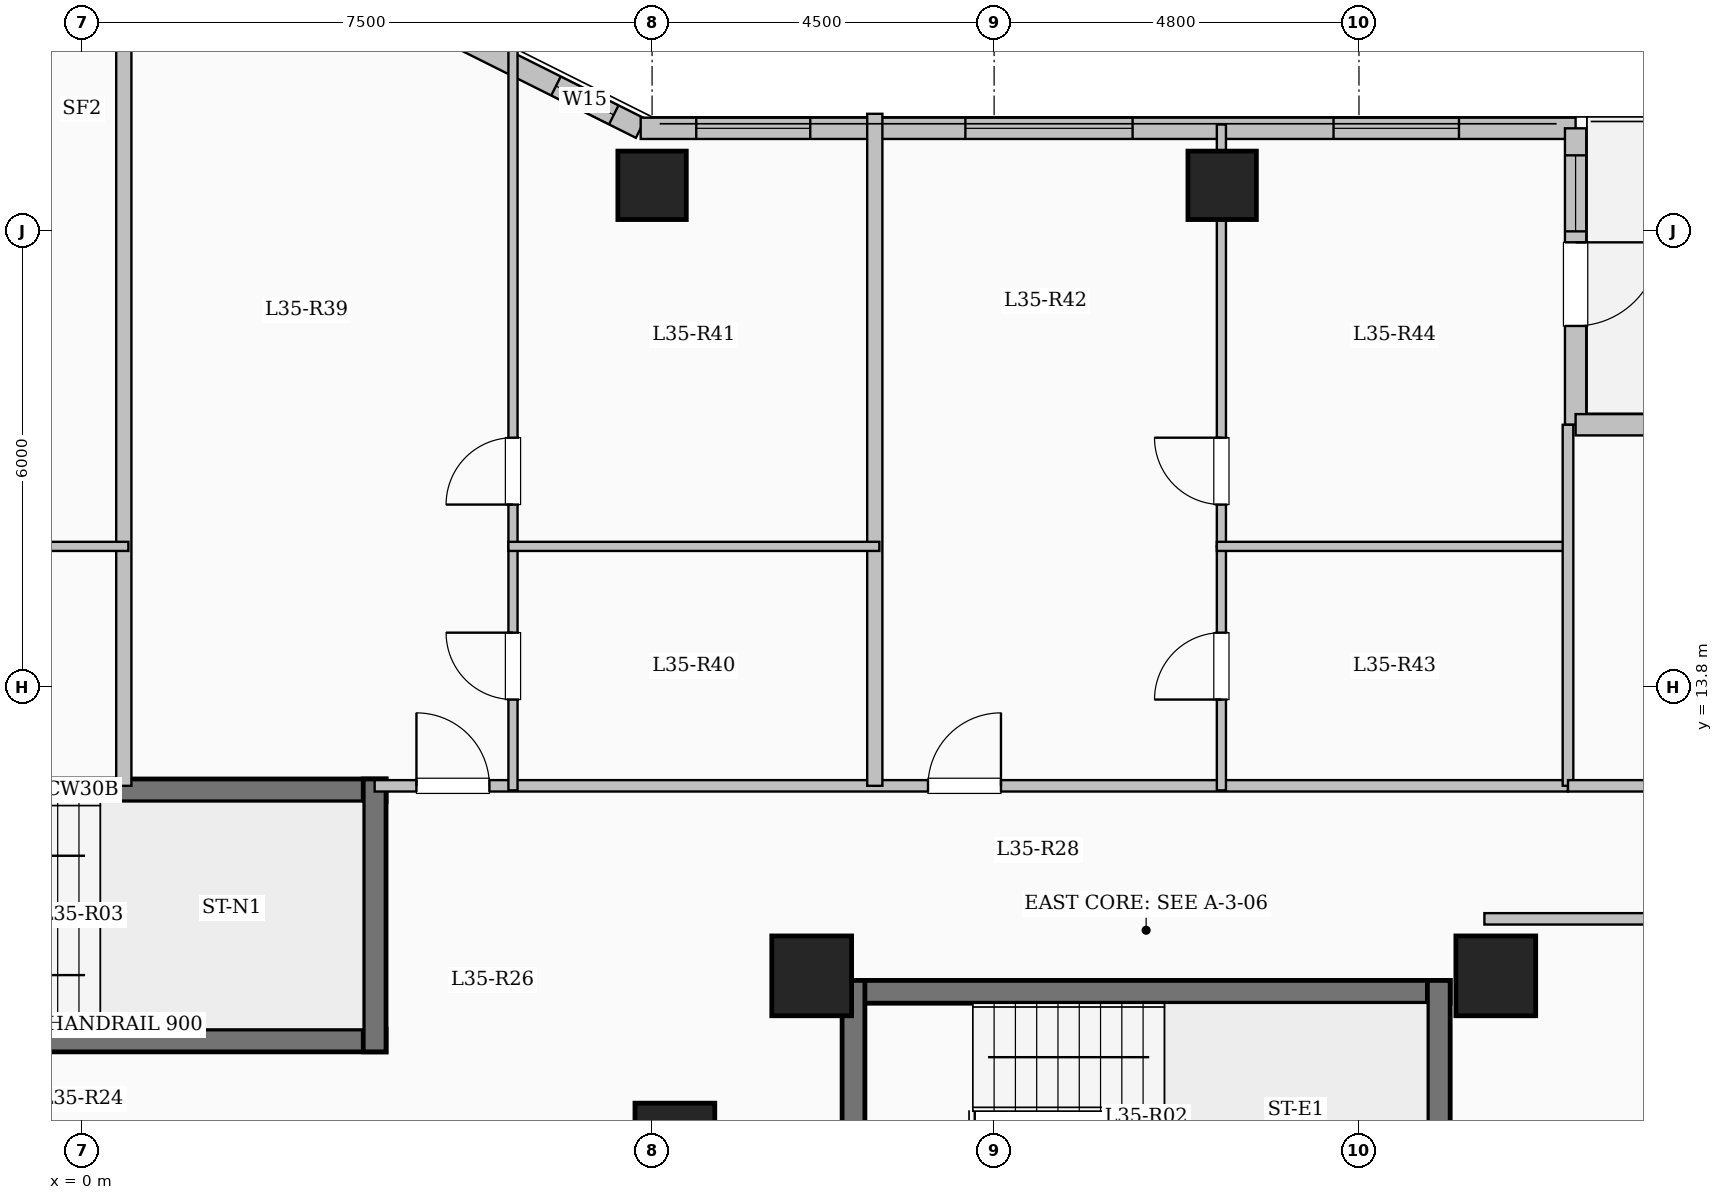
"""IFC4 building model, lengths in metres.
Left out: names, types, materials, properties, quantities, classifications, styles, units other than length and angle.
Written with IfcOpenShell. Run it as: python <this file> out.ifc"""

import sys

from ifc_helpers import new_model, si_unit, direction, frame, frame_2d, origin, origin_2d, place, context, subcontext, project, spatial, rectangle, extrude, element, fill, save


model = new_model("IFC4")
c1 = context("Model", 3, precision=1e-05, world=origin(), true_north=direction((0.0, 1.0)))
c2 = subcontext(c1, "Body", "Model", "MODEL_VIEW")
j1 = project(units=[si_unit("LENGTHUNIT", "METRE"), si_unit("PLANEANGLEUNIT", "RADIAN")], contexts=[c1])
p1 = place(None, origin())
s1 = spatial("IfcSite", under=j1, at=p1, CompositionType="ELEMENT")
p2 = place(p1, origin())
s2 = spatial("IfcBuilding", under=s1, at=p2, CompositionType="ELEMENT")
p3 = place(p2, frame((0.0, 0.0, 132.6)))
s3 = spatial("IfcBuildingStorey", under=s2, at=p3, CompositionType="ELEMENT", Elevation=132.6)
for number, where, z_axis, x_axis in (
    (1, (7.8, 7.8, 0.0), (0.0, 0.0, 1.0), (1.0, 0.0, 0.0)),
    (2, (9.6, 10.0, 0.0), (0.0, 0.0, 1.0), (1.0, 0.0, 0.0)),
    (3, (18.6, 10.0, 0.0), (0.0, 0.0, 1.0), (1.0, 0.0, 0.0)),
):
    element("IfcColumn", number, at=place(p3, frame(where, z_axis=z_axis, x_axis=x_axis)), inside=s3, PredefinedType="COLUMN", context=c2, shape_type="SweptSolid", body=[
        extrude(rectangle(XDim=1.05, YDim=1.05, at=origin_2d()), origin(), (0.0, 0.0, 1.0), 3.35),
    ])
for number, where, z_axis, x_axis in (
    (4, (7.5, 20.4, 0.0), (0.0, 0.0, 1.0), (1.0, 0.0, 0.0)),
    (5, (15.0, 20.4, 0.0), (0.0, 0.0, 1.0), (1.0, 0.0, 0.0)),
):
    element("IfcColumn", number, at=place(p3, frame(where, z_axis=z_axis, x_axis=x_axis)), inside=s3, PredefinedType="COLUMN", context=c2, shape_type="SweptSolid", body=[
        extrude(rectangle(XDim=0.9, YDim=0.9, at=origin_2d()), origin(), (0.0, 0.0, 1.0), 3.35),
    ])
p4 = place(p3, frame((4.35, 22.65, 0.0), z_axis=(0.0, 0.0, 1.0), x_axis=(0.894427191, -0.4472135955, 0.0)))
e6 = element("IfcWall", 6, at=p4, inside=s3, PredefinedType="SOLIDWALL", context=c2, shape_type="SweptSolid", body=[
    extrude(rectangle(XDim=3.354, YDim=0.28, at=frame_2d((1.677, 0.0))), origin(), (0.0, 0.0, 1.0), 3.1),
])
p5 = place(p4, frame((2.108, 0.0, 0.95)))
e7 = element("IfcOpeningElement", 7, at=p5, cuts=e6, PredefinedType="OPENING", context=c2, shape_type="SweptSolid", body=[
    extrude(rectangle(XDim=0.85, YDim=1.5, at=frame_2d((0.425, 0.75))), frame((0.0, 0.15, 0.0), z_axis=(0.0, -1.0, 0.0), x_axis=(1.0, 0.0, 0.0)), (0.0, 0.0, 1.0), 0.3),
])
p6 = place(p3, frame((7.35, 21.15, 0.0), z_axis=(0.0, 0.0, 1.0), x_axis=(1.0, 0.0, 0.0)))
e8 = element("IfcWall", 8, at=p6, inside=s3, PredefinedType="SOLIDWALL", context=c2, shape_type="SweptSolid", body=[
    extrude(rectangle(XDim=12.3, YDim=0.28, at=frame_2d((6.15, 0.0))), origin(), (0.0, 0.0, 1.0), 3.1),
])
p7 = place(p6, frame((0.731, 0.0, 0.9)))
e9 = element("IfcOpeningElement", 9, at=p7, cuts=e8, PredefinedType="OPENING", context=c2, shape_type="SweptSolid", body=[
    extrude(rectangle(XDim=1.5, YDim=1.65, at=frame_2d((0.75, 0.825))), frame((0.0, 0.15, 0.0), z_axis=(0.0, -1.0, 0.0), x_axis=(1.0, 0.0, 0.0)), (0.0, 0.0, 1.0), 0.3),
])
p8 = place(p6, frame((4.272, 0.0, 0.9)))
e10 = element("IfcOpeningElement", 10, at=p8, cuts=e8, PredefinedType="OPENING", context=c2, shape_type="SweptSolid", body=[
    extrude(rectangle(XDim=2.2, YDim=1.75, at=frame_2d((1.1, 0.875))), frame((0.0, 0.15, 0.0), z_axis=(0.0, -1.0, 0.0), x_axis=(1.0, 0.0, 0.0)), (0.0, 0.0, 1.0), 0.3),
])
p9 = place(p6, frame((9.115, 0.0, 0.9)))
e11 = element("IfcOpeningElement", 11, at=p9, cuts=e8, PredefinedType="OPENING", context=c2, shape_type="SweptSolid", body=[
    extrude(rectangle(XDim=1.65, YDim=1.6, at=frame_2d((0.825, 0.8))), frame((0.0, 0.15, 0.0), z_axis=(0.0, -1.0, 0.0), x_axis=(1.0, 0.0, 0.0)), (0.0, 0.0, 1.0), 0.3),
])
p10 = place(p3, frame((19.65, 21.15, 0.0), z_axis=(0.0, 0.0, 1.0), x_axis=(0.0, -1.0, 0.0)))
e12 = element("IfcWall", 12, at=p10, inside=s3, PredefinedType="SOLIDWALL", context=c2, shape_type="SweptSolid", body=[
    extrude(rectangle(XDim=3.9, YDim=0.28, at=frame_2d((1.95, 0.0))), origin(), (0.0, 0.0, 1.0), 3.1),
])
p11 = place(p10, frame((1.5, 0.0, 0.0)))
e13 = element("IfcOpeningElement", 13, at=p11, cuts=e12, PredefinedType="OPENING", context=c2, shape_type="SweptSolid", body=[
    extrude(rectangle(XDim=1.1, YDim=2.2, at=frame_2d((0.55, 1.1))), frame((0.0, 0.15, 0.0), z_axis=(0.0, -1.0, 0.0), x_axis=(1.0, 0.0, 0.0)), (0.0, 0.0, 1.0), 0.3),
])
p12 = place(p10, frame((0.355, 0.0, 0.95)))
e14 = element("IfcOpeningElement", 14, at=p12, cuts=e12, PredefinedType="OPENING", context=c2, shape_type="SweptSolid", body=[
    extrude(rectangle(XDim=1.0, YDim=1.5, at=frame_2d((0.5, 0.75))), frame((0.0, 0.15, 0.0), z_axis=(0.0, -1.0, 0.0), x_axis=(1.0, 0.0, 0.0)), (0.0, 0.0, 1.0), 0.3),
])
p13 = place(p3, frame((19.65, 17.25, 0.0), z_axis=(0.0, 0.0, 1.0), x_axis=(1.0, 0.0, 0.0)))
e15 = element("IfcWall", 15, at=p13, inside=s3, PredefinedType="SOLIDWALL", context=c2, shape_type="SweptSolid", body=[
    extrude(rectangle(XDim=5.4, YDim=0.28, at=frame_2d((2.7, 0.0))), origin(), (0.0, 0.0, 1.0), 3.1),
])
p14 = place(p13, frame((1.675, 0.0, 0.9)))
e16 = element("IfcOpeningElement", 16, at=p14, cuts=e15, PredefinedType="OPENING", context=c2, shape_type="SweptSolid", body=[
    extrude(rectangle(XDim=2.0, YDim=1.7, at=frame_2d((1.0, 0.85))), frame((0.0, 0.15, 0.0), z_axis=(0.0, -1.0, 0.0), x_axis=(1.0, 0.0, 0.0)), (0.0, 0.0, 1.0), 0.3),
])
p15 = place(p3, frame((10.0, 9.79, 0.0), z_axis=(0.0, 0.0, 1.0), x_axis=(1.0, 0.0, 0.0)))
e17 = element("IfcWall", 17, at=p15, inside=s3, PredefinedType="SHEAR", context=c2, shape_type="SweptSolid", body=[
    extrude(rectangle(XDim=8.0, YDim=0.3, at=frame_2d((4.0, 0.0))), origin(), (0.0, 0.0, 1.0), 3.35),
])
for number, where, z_axis, x_axis in (
    (18, (10.15, 6.35, 0.0), (0.0, 0.0, 1.0), (0.0, 1.0, 0.0)),
    (19, (17.85, 6.35, 0.0), (0.0, 0.0, 1.0), (0.0, 1.0, 0.0)),
):
    element("IfcWall", number, at=place(p3, frame(where, z_axis=z_axis, x_axis=x_axis)), inside=s3, PredefinedType="SHEAR", context=c2, shape_type="SweptSolid", body=[
        extrude(rectangle(XDim=3.59, YDim=0.3, at=frame_2d((1.795, 0.0))), origin(), (0.0, 0.0, 1.0), 3.35),
    ])
p16 = place(p3, frame((-4.0, 12.44, 0.0), z_axis=(0.0, 0.0, 1.0), x_axis=(1.0, 0.0, 0.0)))
e20 = element("IfcWall", 20, at=p16, inside=s3, PredefinedType="SHEAR", context=c2, shape_type="SweptSolid", body=[
    extrude(rectangle(XDim=8.0, YDim=0.3, at=frame_2d((4.0, 0.0))), origin(), (0.0, 0.0, 1.0), 3.35),
])
p17 = place(p3, frame((-4.0, 9.15, 0.0), z_axis=(0.0, 0.0, 1.0), x_axis=(1.0, 0.0, 0.0)))
e21 = element("IfcWall", 21, at=p17, inside=s3, PredefinedType="SHEAR", context=c2, shape_type="SweptSolid", body=[
    extrude(rectangle(XDim=8.0, YDim=0.3, at=frame_2d((4.0, 0.0))), origin(), (0.0, 0.0, 1.0), 3.35),
])
p18 = place(p17, frame((0.55, 0.0, 0.0)))
e22 = element("IfcOpeningElement", 22, at=p18, cuts=e21, PredefinedType="OPENING", context=c2, shape_type="SweptSolid", body=[
    extrude(rectangle(XDim=1.0, YDim=2.15, at=frame_2d((0.5, 1.075))), frame((0.0, 0.16, 0.0), z_axis=(0.0, -1.0, 0.0), x_axis=(1.0, 0.0, 0.0)), (0.0, 0.0, 1.0), 0.32),
])
p19 = place(p3, frame((3.85, 9.0, 0.0), z_axis=(0.0, 0.0, 1.0), x_axis=(0.0, 1.0, 0.0)))
e23 = element("IfcWall", 23, at=p19, inside=s3, PredefinedType="SHEAR", context=c2, shape_type="SweptSolid", body=[
    extrude(rectangle(XDim=3.59, YDim=0.3, at=frame_2d((1.795, 0.0))), origin(), (0.0, 0.0, 1.0), 3.35),
])
p20 = place(p3, frame((3.85, 12.5, 0.0), z_axis=(0.0, 0.0, 1.0), x_axis=(1.0, 0.0, 0.0)))
e24 = element("IfcWall", 24, at=p20, inside=s3, PredefinedType="PARTITIONING", context=c2, shape_type="SweptSolid", body=[
    extrude(rectangle(XDim=15.7, YDim=0.15, at=frame_2d((7.85, 0.0))), origin(), (0.0, 0.0, 1.0), 3.1),
])
p21 = place(p20, frame((0.55, 0.0, 0.0)))
e25 = element("IfcOpeningElement", 25, at=p21, cuts=e24, PredefinedType="OPENING", context=c2, shape_type="SweptSolid", body=[
    extrude(rectangle(XDim=0.96, YDim=2.15, at=frame_2d((0.48, 1.075))), frame((0.0, 0.085, 0.0), z_axis=(0.0, -1.0, 0.0), x_axis=(1.0, 0.0, 0.0)), (0.0, 0.0, 1.0), 0.17),
])
p22 = place(p20, frame((7.28, 0.0, 0.0)))
e26 = element("IfcOpeningElement", 26, at=p22, cuts=e24, PredefinedType="OPENING", context=c2, shape_type="SweptSolid", body=[
    extrude(rectangle(XDim=0.96, YDim=2.15, at=frame_2d((0.48, 1.075))), frame((0.0, 0.085, 0.0), z_axis=(0.0, -1.0, 0.0), x_axis=(1.0, 0.0, 0.0)), (0.0, 0.0, 1.0), 0.17),
])
p23 = place(p3, frame((0.55, 12.5, 0.0), z_axis=(0.0, 0.0, 1.0), x_axis=(0.0, 1.0, 0.0)))
e27 = element("IfcWall", 27, at=p23, inside=s3, PredefinedType="SOLIDWALL", context=c2, shape_type="SweptSolid", body=[
    extrude(rectangle(XDim=10.18, YDim=0.2, at=frame_2d((5.09, 0.0))), origin(), (0.0, 0.0, 1.0), 3.1),
])
p24 = place(p3, frame((-4.27, 15.65, 0.0), z_axis=(0.0, 0.0, 1.0), x_axis=(1.0, 0.0, 0.0)))
e28 = element("IfcWall", 28, at=p24, inside=s3, PredefinedType="PARTITIONING", context=c2, shape_type="SweptSolid", body=[
    extrude(rectangle(XDim=4.88, YDim=0.12, at=frame_2d((2.44, 0.0))), origin(), (0.0, 0.0, 1.0), 2.685),
])
p25 = place(p3, frame((10.43, 12.5, 0.0), z_axis=(0.0, 0.0, 1.0), x_axis=(0.0, 1.0, 0.0)))
e29 = element("IfcWall", 29, at=p25, inside=s3, PredefinedType="SOLIDWALL", context=c2, shape_type="SweptSolid", body=[
    extrude(rectangle(XDim=8.841, YDim=0.2, at=frame_2d((4.42, 0.0))), origin(), (0.0, 0.0, 1.0), 3.1),
])
p26 = place(p3, frame((5.67, 12.44, 0.0), z_axis=(0.0, 0.0, 1.0), x_axis=(0.0, 1.0, 0.0)))
e30 = element("IfcWall", 30, at=p26, inside=s3, PredefinedType="PARTITIONING", context=c2, shape_type="SweptSolid", body=[
    extrude(rectangle(XDim=3.21, YDim=0.12, at=frame_2d((1.605, 0.0))), origin(), (0.0, 0.0, 1.0), 3.1),
])
p27 = place(p26, frame((1.195, 0.0, 0.0)))
e31 = element("IfcOpeningElement", 31, at=p27, cuts=e30, PredefinedType="OPENING", context=c2, shape_type="SweptSolid", body=[
    extrude(rectangle(XDim=0.88, YDim=2.1, at=frame_2d((0.44, 1.05))), frame((0.0, 0.07, 0.0), z_axis=(0.0, -1.0, 0.0), x_axis=(1.0, 0.0, 0.0)), (0.0, 0.0, 1.0), 0.14),
])
p28 = place(p3, frame((5.67, 15.65, 0.0), z_axis=(0.0, 0.0, 1.0), x_axis=(0.0, 1.0, 0.0)))
e32 = element("IfcWall", 32, at=p28, inside=s3, PredefinedType="PARTITIONING", context=c2, shape_type="SweptSolid", body=[
    extrude(rectangle(XDim=6.865, YDim=0.12, at=frame_2d((3.433, 0.0))), origin(), (0.0, 0.0, 1.0), 3.1),
])
p29 = place(p28, frame((0.55, 0.0, 0.0)))
e33 = element("IfcOpeningElement", 33, at=p29, cuts=e32, PredefinedType="OPENING", context=c2, shape_type="SweptSolid", body=[
    extrude(rectangle(XDim=0.88, YDim=2.1, at=frame_2d((0.44, 1.05))), frame((0.0, 0.07, 0.0), z_axis=(0.0, -1.0, 0.0), x_axis=(1.0, 0.0, 0.0)), (0.0, 0.0, 1.0), 0.14),
])
p30 = place(p3, frame((5.61, 15.65, 0.0), z_axis=(0.0, 0.0, 1.0), x_axis=(1.0, 0.0, 0.0)))
e34 = element("IfcWall", 34, at=p30, inside=s3, PredefinedType="PARTITIONING", context=c2, shape_type="SweptSolid", body=[
    extrude(rectangle(XDim=4.88, YDim=0.12, at=frame_2d((2.44, 0.0))), origin(), (0.0, 0.0, 1.0), 2.685),
])
p31 = place(p3, frame((14.99, 12.44, 0.0), z_axis=(0.0, 0.0, 1.0), x_axis=(0.0, 1.0, 0.0)))
e35 = element("IfcWall", 35, at=p31, inside=s3, PredefinedType="PARTITIONING", context=c2, shape_type="SweptSolid", body=[
    extrude(rectangle(XDim=3.21, YDim=0.12, at=frame_2d((1.605, 0.0))), origin(), (0.0, 0.0, 1.0), 2.585),
])
p32 = place(p31, frame((1.195, 0.0, 0.0)))
e36 = element("IfcOpeningElement", 36, at=p32, cuts=e35, PredefinedType="OPENING", context=c2, shape_type="SweptSolid", body=[
    extrude(rectangle(XDim=0.88, YDim=2.1, at=frame_2d((0.44, 1.05))), frame((0.0, 0.07, 0.0), z_axis=(0.0, -1.0, 0.0), x_axis=(1.0, 0.0, 0.0)), (0.0, 0.0, 1.0), 0.14),
])
p33 = place(p3, frame((14.99, 15.65, 0.0), z_axis=(0.0, 0.0, 1.0), x_axis=(0.0, 1.0, 0.0)))
e37 = element("IfcWall", 37, at=p33, inside=s3, PredefinedType="PARTITIONING", context=c2, shape_type="SweptSolid", body=[
    extrude(rectangle(XDim=5.55, YDim=0.12, at=frame_2d((2.775, 0.0))), origin(), (0.0, 0.0, 1.0), 2.585),
])
p34 = place(p33, frame((0.55, 0.0, 0.0)))
e38 = element("IfcOpeningElement", 38, at=p34, cuts=e37, PredefinedType="OPENING", context=c2, shape_type="SweptSolid", body=[
    extrude(rectangle(XDim=0.88, YDim=2.1, at=frame_2d((0.44, 1.05))), frame((0.0, 0.07, 0.0), z_axis=(0.0, -1.0, 0.0), x_axis=(1.0, 0.0, 0.0)), (0.0, 0.0, 1.0), 0.14),
])
p35 = place(p3, frame((14.93, 15.65, 0.0), z_axis=(0.0, 0.0, 1.0), x_axis=(1.0, 0.0, 0.0)))
e39 = element("IfcWall", 39, at=p35, inside=s3, PredefinedType="PARTITIONING", context=c2, shape_type="SweptSolid", body=[
    extrude(rectangle(XDim=4.68, YDim=0.12, at=frame_2d((2.34, 0.0))), origin(), (0.0, 0.0, 1.0), 3.1),
])
p36 = place(p3, frame((18.45, 10.75, 0.0), z_axis=(0.0, 0.0, 1.0), x_axis=(1.0, 0.0, 0.0)))
e40 = element("IfcWall", 40, at=p36, inside=s3, PredefinedType="PARTITIONING", context=c2, shape_type="SweptSolid", body=[
    extrude(rectangle(XDim=6.63, YDim=0.15, at=frame_2d((3.315, 0.0))), origin(), (0.0, 0.0, 1.0), 3.1),
])
p37 = place(p3, frame((19.55, 12.5, 0.0), z_axis=(0.0, 0.0, 1.0), x_axis=(0.0, 1.0, 0.0)))
e41 = element("IfcWall", 41, at=p37, inside=s3, PredefinedType="PARTITIONING", context=c2, shape_type="SweptSolid", body=[
    extrude(rectangle(XDim=4.75, YDim=0.14, at=frame_2d((2.375, 0.0))), origin(), (0.0, 0.0, 1.0), 3.1),
])
p38 = place(p3, frame((19.55, 12.5, 0.0), z_axis=(0.0, 0.0, 1.0), x_axis=(1.0, 0.0, 0.0)))
e42 = element("IfcWall", 42, at=p38, inside=s3, PredefinedType="PARTITIONING", context=c2, shape_type="SweptSolid", body=[
    extrude(rectangle(XDim=5.53, YDim=0.15, at=frame_2d((2.765, 0.0))), origin(), (0.0, 0.0, 1.0), 3.1),
])
p39 = place(p38, frame((2.29, 0.0, 0.0)))
e43 = element("IfcOpeningElement", 43, at=p39, cuts=e42, PredefinedType="OPENING", context=c2, shape_type="SweptSolid", body=[
    extrude(rectangle(XDim=0.95, YDim=2.15, at=frame_2d((0.475, 1.075))), frame((0.0, 0.085, 0.0), z_axis=(0.0, -1.0, 0.0), x_axis=(1.0, 0.0, 0.0)), (0.0, 0.0, 1.0), 0.17),
])
p40 = place(p5, origin())
e44 = element("IfcWindow", 44, at=p40, inside=s3, PartitioningType="SINGLE_PANEL", PredefinedType="WINDOW", context=c2, shape_type="SweptSolid", body=[
    extrude(rectangle(XDim=0.85, YDim=1.5, at=frame_2d((0.425, 0.75))), frame((0.0, 0.03, 0.0), z_axis=(0.0, -1.0, 0.0), x_axis=(1.0, 0.0, 0.0)), (0.0, 0.0, 1.0), 0.06),
])
fill(e7, e44)
p41 = place(p7, origin())
e45 = element("IfcWindow", 45, at=p41, inside=s3, PartitioningType="SINGLE_PANEL", PredefinedType="WINDOW", context=c2, shape_type="SweptSolid", body=[
    extrude(rectangle(XDim=1.5, YDim=1.65, at=frame_2d((0.75, 0.825))), frame((0.0, 0.03, 0.0), z_axis=(0.0, -1.0, 0.0), x_axis=(1.0, 0.0, 0.0)), (0.0, 0.0, 1.0), 0.06),
])
fill(e9, e45)
p42 = place(p8, origin())
e46 = element("IfcWindow", 46, at=p42, inside=s3, PartitioningType="SINGLE_PANEL", PredefinedType="WINDOW", context=c2, shape_type="SweptSolid", body=[
    extrude(rectangle(XDim=2.2, YDim=1.75, at=frame_2d((1.1, 0.875))), frame((0.0, 0.03, 0.0), z_axis=(0.0, -1.0, 0.0), x_axis=(1.0, 0.0, 0.0)), (0.0, 0.0, 1.0), 0.06),
])
fill(e10, e46)
p43 = place(p9, origin())
e47 = element("IfcWindow", 47, at=p43, inside=s3, PartitioningType="SINGLE_PANEL", PredefinedType="WINDOW", context=c2, shape_type="SweptSolid", body=[
    extrude(rectangle(XDim=1.65, YDim=1.6, at=frame_2d((0.825, 0.8))), frame((0.0, 0.03, 0.0), z_axis=(0.0, -1.0, 0.0), x_axis=(1.0, 0.0, 0.0)), (0.0, 0.0, 1.0), 0.06),
])
fill(e11, e47)
p44 = place(p11, origin())
e48 = element("IfcDoor", 48, at=p44, inside=s3, OperationType="SINGLE_SWING_LEFT", PredefinedType="DOOR", context=c2, shape_type="SweptSolid", body=[
    extrude(rectangle(XDim=1.1, YDim=2.2, at=frame_2d((0.55, 1.1))), frame((0.0, 0.025, 0.0), z_axis=(0.0, -1.0, 0.0), x_axis=(1.0, 0.0, 0.0)), (0.0, 0.0, 1.0), 0.05),
])
fill(e13, e48)
p45 = place(p12, origin())
e49 = element("IfcWindow", 49, at=p45, inside=s3, PartitioningType="SINGLE_PANEL", PredefinedType="WINDOW", context=c2, shape_type="SweptSolid", body=[
    extrude(rectangle(XDim=1.0, YDim=1.5, at=frame_2d((0.5, 0.75))), frame((0.0, 0.03, 0.0), z_axis=(0.0, -1.0, 0.0), x_axis=(1.0, 0.0, 0.0)), (0.0, 0.0, 1.0), 0.06),
])
fill(e14, e49)
p46 = place(p21, origin())
e50 = element("IfcDoor", 50, at=p46, inside=s3, OperationType="SINGLE_SWING_LEFT", PredefinedType="DOOR", context=c2, shape_type="SweptSolid", body=[
    extrude(rectangle(XDim=0.96, YDim=2.15, at=frame_2d((0.48, 1.075))), frame((0.0, 0.025, 0.0), z_axis=(0.0, -1.0, 0.0), x_axis=(1.0, 0.0, 0.0)), (0.0, 0.0, 1.0), 0.05),
])
fill(e25, e50)
p47 = place(p27, origin())
e51 = element("IfcDoor", 51, at=p47, inside=s3, OperationType="SINGLE_SWING_RIGHT", PredefinedType="DOOR", context=c2, shape_type="SweptSolid", body=[
    extrude(rectangle(XDim=0.88, YDim=2.1, at=frame_2d((0.44, 1.05))), frame((0.0, 0.025, 0.0), z_axis=(0.0, -1.0, 0.0), x_axis=(1.0, 0.0, 0.0)), (0.0, 0.0, 1.0), 0.05),
])
fill(e31, e51)
p48 = place(p29, origin())
e52 = element("IfcDoor", 52, at=p48, inside=s3, OperationType="SINGLE_SWING_LEFT", PredefinedType="DOOR", context=c2, shape_type="SweptSolid", body=[
    extrude(rectangle(XDim=0.88, YDim=2.1, at=frame_2d((0.44, 1.05))), frame((0.0, 0.025, 0.0), z_axis=(0.0, -1.0, 0.0), x_axis=(1.0, 0.0, 0.0)), (0.0, 0.0, 1.0), 0.05),
])
fill(e33, e52)
p49 = place(p22, origin())
e53 = element("IfcDoor", 53, at=p49, inside=s3, OperationType="SINGLE_SWING_RIGHT", PredefinedType="DOOR", context=c2, shape_type="SweptSolid", body=[
    extrude(rectangle(XDim=0.96, YDim=2.15, at=frame_2d((0.48, 1.075))), frame((0.0, 0.025, 0.0), z_axis=(0.0, -1.0, 0.0), x_axis=(1.0, 0.0, 0.0)), (0.0, 0.0, 1.0), 0.05),
])
fill(e26, e53)
p50 = place(p32, origin())
e54 = element("IfcDoor", 54, at=p50, inside=s3, OperationType="SINGLE_SWING_LEFT", PredefinedType="DOOR", context=c2, shape_type="SweptSolid", body=[
    extrude(rectangle(XDim=0.88, YDim=2.1, at=frame_2d((0.44, 1.05))), frame((0.0, 0.025, 0.0), z_axis=(0.0, -1.0, 0.0), x_axis=(1.0, 0.0, 0.0)), (0.0, 0.0, 1.0), 0.05),
])
fill(e36, e54)
p51 = place(p34, origin())
e55 = element("IfcDoor", 55, at=p51, inside=s3, OperationType="SINGLE_SWING_RIGHT", PredefinedType="DOOR", context=c2, shape_type="SweptSolid", body=[
    extrude(rectangle(XDim=0.88, YDim=2.1, at=frame_2d((0.44, 1.05))), frame((0.0, 0.025, 0.0), z_axis=(0.0, -1.0, 0.0), x_axis=(1.0, 0.0, 0.0)), (0.0, 0.0, 1.0), 0.05),
])
fill(e38, e55)
save(model, sys.argv[1])
